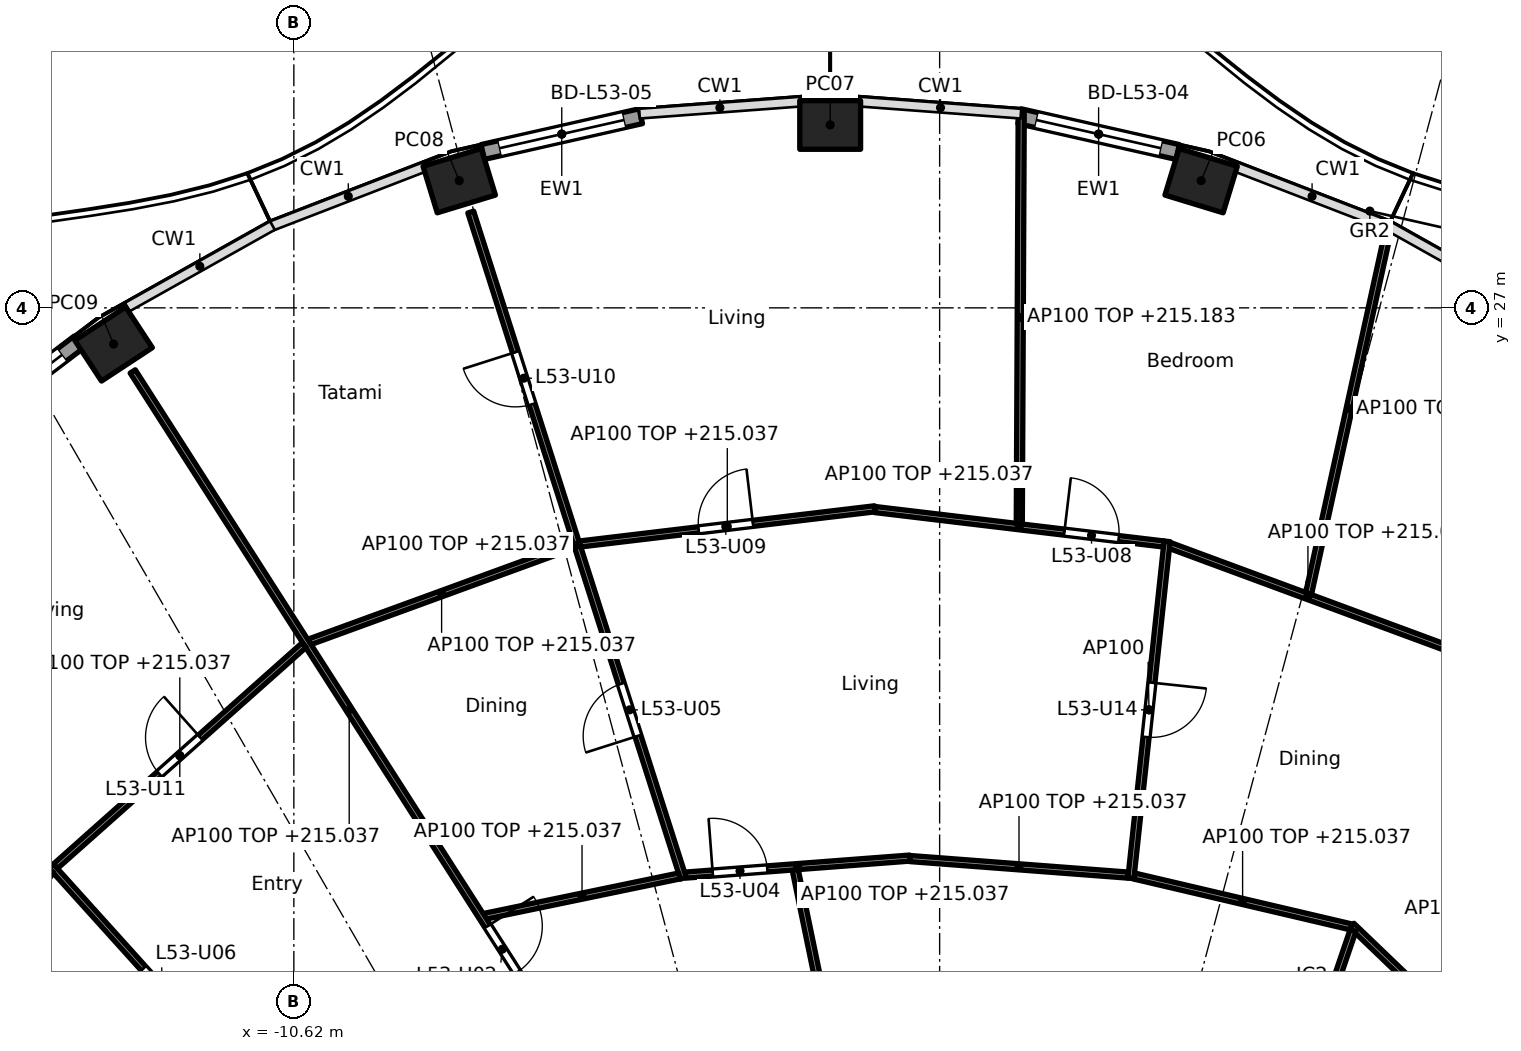
"""IFC4 building model, lengths in metres.
Left out: names, types, materials, properties, quantities, classifications, styles, units other than length and angle.
Written with IfcOpenShell. Run it as: python <this file> out.ifc"""

import sys

from ifc_helpers import new_model, si_unit, direction, frame, frame_2d, origin, origin_2d, place, context, subcontext, project, spatial, rectangle, hollow_rectangle, extrude, element, fill, save


model = new_model("IFC4")
c1 = context("Model", 3, precision=1e-05, world=origin(), true_north=direction((0.0, 1.0)))
c2 = subcontext(c1, "Body", "Model", "MODEL_VIEW")
j1 = project(units=[si_unit("LENGTHUNIT", "METRE"), si_unit("PLANEANGLEUNIT", "RADIAN")], contexts=[c1])
p1 = place(None, origin())
s1 = spatial("IfcSite", under=j1, at=p1, CompositionType="ELEMENT")
p2 = place(p1, origin())
s2 = spatial("IfcBuilding", under=s1, at=p2, CompositionType="ELEMENT")
p3 = place(p2, frame((0.0, 0.0, 212.2)))
s3 = spatial("IfcBuildingStorey", under=s2, at=p3, CompositionType="ELEMENT", Elevation=212.2)
for number, where, z_axis, x_axis in (
    (1, (4.3, 29.092, -0.26), (0.0, 0.0, 1.0), (-0.957, 0.292, 0.0)),
    (2, (-1.8, 30.008, -0.26), (0.0, 0.0, 1.0), (-1.0, 0.0, 0.0)),
    (3, (-7.9, 29.092, -0.26), (0.0, 0.0, 1.0), (-0.957, -0.292, 0.0)),
    (4, (-13.585, 26.405, -0.26), (0.0, 0.0, 1.0), (-0.836, -0.549, 0.0)),
):
    element("IfcColumn", number, at=place(p3, frame(where, z_axis=z_axis, x_axis=x_axis)), inside=s3, PredefinedType="COLUMN", context=c2, shape_type="SweptSolid", body=[
        extrude(hollow_rectangle(XDim=1.0, YDim=0.8, WallThickness=0.032, at=origin_2d()), origin(), (0.0, 0.0, 1.0), 3.96),
    ])
p4 = place(p3, frame((1.314, 30.151, 0.0), z_axis=(0.0, 0.0, 1.0), x_axis=(0.975324089124, -0.220777990694, 0.0)))
e5 = element("IfcWall", 5, at=p4, inside=s3, PredefinedType="SOLIDWALL", context=c2, shape_type="SweptSolid", body=[
    extrude(rectangle(XDim=2.666, YDim=0.25, at=frame_2d((1.333, 0.0))), origin(), (0.0, 0.0, 1.0), 3.44),
])
p5 = place(p4, frame((0.283, 0.0, 0.0)))
e6 = element("IfcOpeningElement", 6, at=p5, cuts=e5, PredefinedType="OPENING", context=c2, shape_type="SweptSolid", body=[
    extrude(rectangle(XDim=2.1, YDim=2.4, at=frame_2d((1.05, 1.2))), frame((0.0, 0.135, 0.0), z_axis=(0.0, -1.0, 0.0), x_axis=(1.0, 0.0, 0.0)), (0.0, 0.0, 1.0), 0.27),
])
p6 = place(p3, frame((-7.514, 29.563, 0.0), z_axis=(0.0, 0.0, 1.0), x_axis=(0.975324089124, 0.220777990694, 0.0)))
e7 = element("IfcWall", 7, at=p6, inside=s3, PredefinedType="SOLIDWALL", context=c2, shape_type="SweptSolid", body=[
    extrude(rectangle(XDim=2.666, YDim=0.25, at=frame_2d((1.333, 0.0))), origin(), (0.0, 0.0, 1.0), 3.44),
])
p7 = place(p6, frame((0.283, 0.0, 0.0)))
e8 = element("IfcOpeningElement", 8, at=p7, cuts=e7, PredefinedType="OPENING", context=c2, shape_type="SweptSolid", body=[
    extrude(rectangle(XDim=2.1, YDim=2.4, at=frame_2d((1.05, 1.2))), frame((0.0, 0.135, 0.0), z_axis=(0.0, -1.0, 0.0), x_axis=(1.0, 0.0, 0.0)), (0.0, 0.0, 1.0), 0.27),
])
p8 = place(p3, frame((-16.377, 24.748, 0.0), z_axis=(0.0, 0.0, 1.0), x_axis=(0.795990084031, 0.60530966135, 0.0)))
e9 = element("IfcWall", 9, at=p8, inside=s3, PredefinedType="SOLIDWALL", context=c2, shape_type="SweptSolid", body=[
    extrude(rectangle(XDim=2.789, YDim=0.25, at=frame_2d((1.394, 0.0))), origin(), (0.0, 0.0, 1.0), 3.44),
])
p9 = place(p8, frame((0.344, 0.0, 0.0)))
e10 = element("IfcOpeningElement", 10, at=p9, cuts=e9, PredefinedType="OPENING", context=c2, shape_type="SweptSolid", body=[
    extrude(rectangle(XDim=2.1, YDim=2.4, at=frame_2d((1.05, 1.2))), frame((0.0, 0.135, 0.0), z_axis=(0.0, -1.0, 0.0), x_axis=(1.0, 0.0, 0.0)), (0.0, 0.0, 1.0), 0.27),
])
p10 = place(p3, frame((7.71, 10.197, 0.0), z_axis=(0.0, 0.0, 1.0), x_axis=(0.521477621335, 0.853264959111, 0.0)))
e11 = element("IfcWall", 11, at=p10, inside=s3, PredefinedType="PARTITIONING", context=c2, shape_type="SweptSolid", body=[
    extrude(rectangle(XDim=8.941, YDim=0.1, at=frame_2d((4.471, 0.0))), origin(), (0.0, 0.0, 1.0), 2.762),
])
p11 = place(p10, frame((6.121, 0.0, 0.0)))
e12 = element("IfcOpeningElement", 12, at=p11, cuts=e11, PredefinedType="OPENING", context=c2, shape_type="SweptSolid", body=[
    extrude(rectangle(XDim=0.9, YDim=2.1, at=frame_2d((0.45, 1.05))), frame((0.0, 0.06, 0.0), z_axis=(0.0, -1.0, 0.0), x_axis=(1.0, 0.0, 0.0)), (0.0, 0.0, 1.0), 0.12),
])
p12 = place(p3, frame((9.89, 13.858, 0.0), z_axis=(0.0, 0.0, 1.0), x_axis=(-0.72167233993, 0.692234811159, 0.0)))
e13 = element("IfcWall", 13, at=p12, inside=s3, PredefinedType="PARTITIONING", context=c2, shape_type="SweptSolid", body=[
    extrude(rectangle(XDim=4.313, YDim=0.1, at=frame_2d((2.156, 0.0))), origin(), (0.0, 0.0, 1.0), 2.837),
])
p13 = place(p12, frame((0.883, 0.0, 0.0)))
e14 = element("IfcOpeningElement", 14, at=p13, cuts=e13, PredefinedType="OPENING", context=c2, shape_type="SweptSolid", body=[
    extrude(rectangle(XDim=0.9, YDim=2.1, at=frame_2d((0.45, 1.05))), frame((0.0, 0.06, 0.0), z_axis=(0.0, -1.0, 0.0), x_axis=(1.0, 0.0, 0.0)), (0.0, 0.0, 1.0), 0.12),
])
p14 = place(p3, frame((6.139, 14.829, 0.0), z_axis=(0.0, 0.0, 1.0), x_axis=(0.32278593828, 0.946471995385, 0.0)))
e15 = element("IfcWall", 15, at=p14, inside=s3, PredefinedType="PARTITIONING", context=c2, shape_type="SweptSolid", body=[
    extrude(rectangle(XDim=2.042, YDim=0.1, at=frame_2d((1.021, 0.0))), origin(), (0.0, 0.0, 1.0), 3.44),
])
p15 = place(p3, frame((6.766, 16.82, 0.0), z_axis=(0.0, 0.0, 1.0), x_axis=(-0.973612608559, 0.22820711745, 0.0)))
e16 = element("IfcWall", 16, at=p15, inside=s3, PredefinedType="PARTITIONING", context=c2, shape_type="SweptSolid", body=[
    extrude(rectangle(XDim=3.663, YDim=0.1, at=frame_2d((1.832, 0.0))), origin(), (0.0, 0.0, 1.0), 2.837),
])
p16 = place(p3, frame((8.331, 21.411, 0.0), z_axis=(0.0, 0.0, 1.0), x_axis=(-0.937891982431, 0.346927412136, 0.0)))
e17 = element("IfcWall", 17, at=p16, inside=s3, PredefinedType="PARTITIONING", context=c2, shape_type="SweptSolid", body=[
    extrude(rectangle(XDim=4.85, YDim=0.1, at=frame_2d((2.425, 0.0))), origin(), (0.0, 0.0, 1.0), 2.837),
])
p17 = place(p3, frame((6.067, 22.301, 0.0), z_axis=(0.0, 0.0, 1.0), x_axis=(0.214401821533, 0.976745544614, 0.0)))
e18 = element("IfcWall", 18, at=p17, inside=s3, PredefinedType="PARTITIONING", context=c2, shape_type="SweptSolid", body=[
    extrude(rectangle(XDim=6.228, YDim=0.1, at=frame_2d((3.114, 0.0))), origin(), (0.0, 0.0, 1.0), 2.983),
])
p18 = place(p3, frame((3.145, 17.618, 0.0), z_axis=(0.0, 0.0, 1.0), x_axis=(0.106820754108, 0.994278294288, 0.0)))
e19 = element("IfcWall", 19, at=p18, inside=s3, PredefinedType="PARTITIONING", context=c2, shape_type="SweptSolid", body=[
    extrude(rectangle(XDim=5.574, YDim=0.1, at=frame_2d((2.787, 0.0))), origin(), (0.0, 0.0, 1.0), 3.44),
])
p19 = place(p18, frame((2.337, 0.0, 0.0)))
e20 = element("IfcOpeningElement", 20, at=p19, cuts=e19, PredefinedType="OPENING", context=c2, shape_type="SweptSolid", body=[
    extrude(rectangle(XDim=0.9, YDim=2.1, at=frame_2d((0.45, 1.05))), frame((0.0, 0.06, 0.0), z_axis=(0.0, -1.0, 0.0), x_axis=(1.0, 0.0, 0.0)), (0.0, 0.0, 1.0), 0.12),
])
p20 = place(p3, frame((3.101, 17.671, 0.0), z_axis=(0.0, 0.0, 1.0), x_axis=(-0.997133705575, 0.075659587668, 0.0)))
e21 = element("IfcWall", 21, at=p20, inside=s3, PredefinedType="PARTITIONING", context=c2, shape_type="SweptSolid", body=[
    extrude(rectangle(XDim=3.601, YDim=0.1, at=frame_2d((1.801, 0.0))), origin(), (0.0, 0.0, 1.0), 2.837),
])
p21 = place(p3, frame((3.686, 23.117, 0.0), z_axis=(0.0, 0.0, 1.0), x_axis=(-0.992965872314, 0.11840091393, 0.0)))
e22 = element("IfcWall", 22, at=p21, inside=s3, PredefinedType="PARTITIONING", context=c2, shape_type="SweptSolid", body=[
    extrude(rectangle(XDim=4.786, YDim=0.1, at=frame_2d((2.393, 0.0))), origin(), (0.0, 0.0, 1.0), 2.837),
])
p22 = place(p21, frame((0.746, 0.0, 0.0)))
e23 = element("IfcOpeningElement", 23, at=p22, cuts=e22, PredefinedType="OPENING", context=c2, shape_type="SweptSolid", body=[
    extrude(rectangle(XDim=0.9, YDim=2.1, at=frame_2d((0.45, 1.05))), frame((0.0, 0.06, 0.0), z_axis=(0.0, -1.0, 0.0), x_axis=(1.0, 0.0, 0.0)), (0.0, 0.0, 1.0), 0.12),
])
p23 = place(p3, frame((1.31, 23.45, 0.0), z_axis=(0.0, 0.0, 1.0), x_axis=(0.004678732305, 0.999989054672, 0.0)))
e24 = element("IfcWall", 24, at=p23, inside=s3, PredefinedType="PARTITIONING", context=c2, shape_type="SweptSolid", body=[
    extrude(rectangle(XDim=6.783, YDim=0.1, at=frame_2d((3.392, 0.0))), origin(), (0.0, 0.0, 1.0), 2.983),
])
p24 = place(p3, frame((-0.49, 17.951, 0.0), z_axis=(0.0, 0.0, 1.0), x_axis=(-0.997133495787, -0.075662352452, 0.0)))
e25 = element("IfcWall", 25, at=p24, inside=s3, PredefinedType="PARTITIONING", context=c2, shape_type="SweptSolid", body=[
    extrude(rectangle(XDim=3.701, YDim=0.1, at=frame_2d((1.851, 0.0))), origin(), (0.0, 0.0, 1.0), 2.837),
])
p25 = place(p24, frame((2.351, 0.0, 0.0)))
e26 = element("IfcOpeningElement", 26, at=p25, cuts=e25, PredefinedType="OPENING", context=c2, shape_type="SweptSolid", body=[
    extrude(rectangle(XDim=0.9, YDim=2.1, at=frame_2d((0.45, 1.05))), frame((0.0, 0.06, 0.0), z_axis=(0.0, -1.0, 0.0), x_axis=(1.0, 0.0, 0.0)), (0.0, 0.0, 1.0), 0.12),
])
p26 = place(p3, frame((-1.066, 23.695, 0.0), z_axis=(0.0, 0.0, 1.0), x_axis=(-0.992962413335, -0.118429918957, 0.0)))
e27 = element("IfcWall", 27, at=p26, inside=s3, PredefinedType="PARTITIONING", context=c2, shape_type="SweptSolid", body=[
    extrude(rectangle(XDim=4.886, YDim=0.1, at=frame_2d((2.443, 0.0))), origin(), (0.0, 0.0, 1.0), 2.837),
])
p27 = place(p26, frame((2.018, 0.0, 0.0)))
e28 = element("IfcOpeningElement", 28, at=p27, cuts=e27, PredefinedType="OPENING", context=c2, shape_type="SweptSolid", body=[
    extrude(rectangle(XDim=0.9, YDim=2.1, at=frame_2d((0.45, 1.05))), frame((0.0, 0.06, 0.0), z_axis=(0.0, -1.0, 0.0), x_axis=(1.0, 0.0, 0.0)), (0.0, 0.0, 1.0), 0.12),
])
p28 = place(p3, frame((-1.321, 12.663, 0.0), z_axis=(0.0, 0.0, 1.0), x_axis=(-0.202526486639, 0.979276785291, 0.0)))
e29 = element("IfcWall", 29, at=p28, inside=s3, PredefinedType="PARTITIONING", context=c2, shape_type="SweptSolid", body=[
    extrude(rectangle(XDim=5.204, YDim=0.1, at=frame_2d((2.602, 0.0))), origin(), (0.0, 0.0, 1.0), 2.762),
])
p29 = place(p28, frame((2.152, 0.0, 0.0)))
e30 = element("IfcOpeningElement", 30, at=p29, cuts=e29, PredefinedType="OPENING", context=c2, shape_type="SweptSolid", body=[
    extrude(rectangle(XDim=0.9, YDim=2.1, at=frame_2d((0.45, 1.05))), frame((0.0, 0.06, 0.0), z_axis=(0.0, -1.0, 0.0), x_axis=(1.0, 0.0, 0.0)), (0.0, 0.0, 1.0), 0.12),
])
p30 = place(p3, frame((-4.215, 17.62, 0.0), z_axis=(0.0, 0.0, 1.0), x_axis=(-0.303985237897, 0.952676742206, 0.0)))
e31 = element("IfcWall", 31, at=p30, inside=s3, PredefinedType="PARTITIONING", context=c2, shape_type="SweptSolid", body=[
    extrude(rectangle(XDim=11.499, YDim=0.1, at=frame_2d((5.75, 0.0))), origin(), (0.0, 0.0, 1.0), 2.837),
])
p31 = place(p30, frame((2.457, 0.0, 0.0)))
e32 = element("IfcOpeningElement", 32, at=p31, cuts=e31, PredefinedType="OPENING", context=c2, shape_type="SweptSolid", body=[
    extrude(rectangle(XDim=0.9, YDim=2.1, at=frame_2d((0.45, 1.05))), frame((0.0, 0.06, 0.0), z_axis=(0.0, -1.0, 0.0), x_axis=(1.0, 0.0, 0.0)), (0.0, 0.0, 1.0), 0.12),
])
p32 = place(p30, frame((8.181, 0.0, 0.0)))
e33 = element("IfcOpeningElement", 33, at=p32, cuts=e31, PredefinedType="OPENING", context=c2, shape_type="SweptSolid", body=[
    extrude(rectangle(XDim=0.9, YDim=2.1, at=frame_2d((0.45, 1.05))), frame((0.0, 0.06, 0.0), z_axis=(0.0, -1.0, 0.0), x_axis=(1.0, 0.0, 0.0)), (0.0, 0.0, 1.0), 0.12),
])
p33 = place(p3, frame((-4.28, 17.657, 0.0), z_axis=(0.0, 0.0, 1.0), x_axis=(-0.979205232861, -0.202872156637, 0.0)))
e34 = element("IfcWall", 34, at=p33, inside=s3, PredefinedType="PARTITIONING", context=c2, shape_type="SweptSolid", body=[
    extrude(rectangle(XDim=3.271, YDim=0.1, at=frame_2d((1.635, 0.0))), origin(), (0.0, 0.0, 1.0), 2.837),
])
p34 = place(p3, frame((-6.014, 23.094, 0.0), z_axis=(0.0, 0.0, 1.0), x_axis=(-0.939417400947, -0.342775359089, 0.0)))
e35 = element("IfcWall", 35, at=p34, inside=s3, PredefinedType="PARTITIONING", context=c2, shape_type="SweptSolid", body=[
    extrude(rectangle(XDim=4.633, YDim=0.1, at=frame_2d((2.316, 0.0))), origin(), (0.0, 0.0, 1.0), 2.837),
])
p35 = place(p3, frame((-6.15, 14.824, 0.0), z_axis=(0.0, 0.0, 1.0), x_axis=(-0.538870687577, 0.842388498301, 0.0)))
e36 = element("IfcWall", 36, at=p35, inside=s3, PredefinedType="PARTITIONING", context=c2, shape_type="SweptSolid", body=[
    extrude(rectangle(XDim=13.213, YDim=0.1, at=frame_2d((6.606, 0.0))), origin(), (0.0, 0.0, 1.0), 2.837),
])
p36 = place(p35, frame((1.483, 0.0, 0.0)))
e37 = element("IfcOpeningElement", 37, at=p36, cuts=e36, PredefinedType="OPENING", context=c2, shape_type="SweptSolid", body=[
    extrude(rectangle(XDim=0.9, YDim=2.1, at=frame_2d((0.45, 1.05))), frame((0.0, 0.06, 0.0), z_axis=(0.0, -1.0, 0.0), x_axis=(1.0, 0.0, 0.0)), (0.0, 0.0, 1.0), 0.12),
])
p37 = place(p3, frame((-10.45, 21.455, 0.0), z_axis=(0.0, 0.0, 1.0), x_axis=(-0.747150931973, -0.66465441009, 0.0)))
e38 = element("IfcWall", 38, at=p37, inside=s3, PredefinedType="PARTITIONING", context=c2, shape_type="SweptSolid", body=[
    extrude(rectangle(XDim=5.475, YDim=0.1, at=frame_2d((2.737, 0.0))), origin(), (0.0, 0.0, 1.0), 2.837),
])
p38 = place(p37, frame((2.288, 0.0, 0.0)))
e39 = element("IfcOpeningElement", 39, at=p38, cuts=e38, PredefinedType="OPENING", context=c2, shape_type="SweptSolid", body=[
    extrude(rectangle(XDim=0.9, YDim=2.1, at=frame_2d((0.45, 1.05))), frame((0.0, 0.06, 0.0), z_axis=(0.0, -1.0, 0.0), x_axis=(1.0, 0.0, 0.0)), (0.0, 0.0, 1.0), 0.12),
])
p39 = place(p3, frame((-7.725, 10.186, 0.0), z_axis=(0.0, 0.0, 1.0), x_axis=(-0.669819599194, 0.742523874725, 0.0)))
e40 = element("IfcWall", 40, at=p39, inside=s3, PredefinedType="PARTITIONING", context=c2, shape_type="SweptSolid", body=[
    extrude(rectangle(XDim=10.282, YDim=0.1, at=frame_2d((5.141, 0.0))), origin(), (0.0, 0.0, 1.0), 2.762),
])
p40 = place(p39, frame((2.0, 0.0, 0.0)))
e41 = element("IfcOpeningElement", 41, at=p40, cuts=e40, PredefinedType="OPENING", context=c2, shape_type="SweptSolid", body=[
    extrude(rectangle(XDim=0.9, YDim=2.1, at=frame_2d((0.45, 1.05))), frame((0.0, 0.06, 0.0), z_axis=(0.0, -1.0, 0.0), x_axis=(1.0, 0.0, 0.0)), (0.0, 0.0, 1.0), 0.12),
])
p41 = place(p39, frame((7.116, 0.0, 0.0)))
e42 = element("IfcOpeningElement", 42, at=p41, cuts=e40, PredefinedType="OPENING", context=c2, shape_type="SweptSolid", body=[
    extrude(rectangle(XDim=0.9, YDim=2.1, at=frame_2d((0.45, 1.05))), frame((0.0, 0.06, 0.0), z_axis=(0.0, -1.0, 0.0), x_axis=(1.0, 0.0, 0.0)), (0.0, 0.0, 1.0), 0.12),
])
p42 = place(p3, frame((-14.608, 17.743, 0.0), z_axis=(0.0, 0.0, 1.0), x_axis=(-0.596174489482, -0.8028548923, 0.0)))
e43 = element("IfcWall", 43, at=p42, inside=s3, PredefinedType="PARTITIONING", context=c2, shape_type="SweptSolid", body=[
    extrude(rectangle(XDim=5.442, YDim=0.1, at=frame_2d((2.721, 0.0))), origin(), (0.0, 0.0, 1.0), 2.837),
])
p43 = place(p5, origin())
e44 = element("IfcDoor", 44, at=p43, inside=s3, OperationType="SLIDING_TO_LEFT", PredefinedType="DOOR", context=c2, shape_type="SweptSolid", body=[
    extrude(rectangle(XDim=2.1, YDim=2.4, at=frame_2d((1.05, 1.2))), frame((0.0, 0.025, 0.0), z_axis=(0.0, -1.0, 0.0), x_axis=(1.0, 0.0, 0.0)), (0.0, 0.0, 1.0), 0.05),
])
fill(e6, e44)
p44 = place(p7, origin())
e45 = element("IfcDoor", 45, at=p44, inside=s3, OperationType="SLIDING_TO_LEFT", PredefinedType="DOOR", context=c2, shape_type="SweptSolid", body=[
    extrude(rectangle(XDim=2.1, YDim=2.4, at=frame_2d((1.05, 1.2))), frame((0.0, 0.025, 0.0), z_axis=(0.0, -1.0, 0.0), x_axis=(1.0, 0.0, 0.0)), (0.0, 0.0, 1.0), 0.05),
])
fill(e8, e45)
p45 = place(p9, origin())
e46 = element("IfcDoor", 46, at=p45, inside=s3, OperationType="SLIDING_TO_LEFT", PredefinedType="DOOR", context=c2, shape_type="SweptSolid", body=[
    extrude(rectangle(XDim=2.1, YDim=2.4, at=frame_2d((1.05, 1.2))), frame((0.0, 0.025, 0.0), z_axis=(0.0, -1.0, 0.0), x_axis=(1.0, 0.0, 0.0)), (0.0, 0.0, 1.0), 0.05),
])
fill(e10, e46)
p46 = place(p36, frame((0.9, 0.0, 0.0), x_axis=(-1.0, 0.0, 0.0)))
e47 = element("IfcDoor", 47, at=p46, inside=s3, OperationType="SINGLE_SWING_LEFT", PredefinedType="DOOR", context=c2, shape_type="SweptSolid", body=[
    extrude(rectangle(XDim=0.9, YDim=2.1, at=frame_2d((0.45, 1.05))), frame((0.0, 0.025, 0.0), z_axis=(0.0, -1.0, 0.0), x_axis=(1.0, 0.0, 0.0)), (0.0, 0.0, 1.0), 0.05),
])
fill(e37, e47)
p47 = place(p25, frame((0.9, 0.0, 0.0), x_axis=(-1.0, 0.0, 0.0)))
e48 = element("IfcDoor", 48, at=p47, inside=s3, OperationType="SINGLE_SWING_LEFT", PredefinedType="DOOR", context=c2, shape_type="SweptSolid", body=[
    extrude(rectangle(XDim=0.9, YDim=2.1, at=frame_2d((0.45, 1.05))), frame((0.0, 0.025, 0.0), z_axis=(0.0, -1.0, 0.0), x_axis=(1.0, 0.0, 0.0)), (0.0, 0.0, 1.0), 0.05),
])
fill(e26, e48)
p48 = place(p31, origin())
e49 = element("IfcDoor", 49, at=p48, inside=s3, OperationType="SINGLE_SWING_LEFT", PredefinedType="DOOR", context=c2, shape_type="SweptSolid", body=[
    extrude(rectangle(XDim=0.9, YDim=2.1, at=frame_2d((0.45, 1.05))), frame((0.0, 0.025, 0.0), z_axis=(0.0, -1.0, 0.0), x_axis=(1.0, 0.0, 0.0)), (0.0, 0.0, 1.0), 0.05),
])
fill(e32, e49)
p49 = place(p41, origin())
e50 = element("IfcDoor", 50, at=p49, inside=s3, OperationType="SINGLE_SWING_RIGHT", PredefinedType="DOOR", context=c2, shape_type="SweptSolid", body=[
    extrude(rectangle(XDim=0.9, YDim=2.1, at=frame_2d((0.45, 1.05))), frame((0.0, 0.025, 0.0), z_axis=(0.0, -1.0, 0.0), x_axis=(1.0, 0.0, 0.0)), (0.0, 0.0, 1.0), 0.05),
])
fill(e42, e50)
p50 = place(p22, frame((0.9, 0.0, 0.0), x_axis=(-1.0, 0.0, 0.0)))
e51 = element("IfcDoor", 51, at=p50, inside=s3, OperationType="SINGLE_SWING_LEFT", PredefinedType="DOOR", context=c2, shape_type="SweptSolid", body=[
    extrude(rectangle(XDim=0.9, YDim=2.1, at=frame_2d((0.45, 1.05))), frame((0.0, 0.025, 0.0), z_axis=(0.0, -1.0, 0.0), x_axis=(1.0, 0.0, 0.0)), (0.0, 0.0, 1.0), 0.05),
])
fill(e23, e51)
p51 = place(p27, frame((0.9, 0.0, 0.0), x_axis=(-1.0, 0.0, 0.0)))
e52 = element("IfcDoor", 52, at=p51, inside=s3, OperationType="SINGLE_SWING_RIGHT", PredefinedType="DOOR", context=c2, shape_type="SweptSolid", body=[
    extrude(rectangle(XDim=0.9, YDim=2.1, at=frame_2d((0.45, 1.05))), frame((0.0, 0.025, 0.0), z_axis=(0.0, -1.0, 0.0), x_axis=(1.0, 0.0, 0.0)), (0.0, 0.0, 1.0), 0.05),
])
fill(e28, e52)
p52 = place(p32, origin())
e53 = element("IfcDoor", 53, at=p52, inside=s3, OperationType="SINGLE_SWING_RIGHT", PredefinedType="DOOR", context=c2, shape_type="SweptSolid", body=[
    extrude(rectangle(XDim=0.9, YDim=2.1, at=frame_2d((0.45, 1.05))), frame((0.0, 0.025, 0.0), z_axis=(0.0, -1.0, 0.0), x_axis=(1.0, 0.0, 0.0)), (0.0, 0.0, 1.0), 0.05),
])
fill(e33, e53)
p53 = place(p38, frame((0.9, 0.0, 0.0), x_axis=(-1.0, 0.0, 0.0)))
e54 = element("IfcDoor", 54, at=p53, inside=s3, OperationType="SINGLE_SWING_RIGHT", PredefinedType="DOOR", context=c2, shape_type="SweptSolid", body=[
    extrude(rectangle(XDim=0.9, YDim=2.1, at=frame_2d((0.45, 1.05))), frame((0.0, 0.025, 0.0), z_axis=(0.0, -1.0, 0.0), x_axis=(1.0, 0.0, 0.0)), (0.0, 0.0, 1.0), 0.05),
])
fill(e39, e54)
p54 = place(p19, frame((0.9, 0.0, 0.0), x_axis=(-1.0, 0.0, 0.0)))
e55 = element("IfcDoor", 55, at=p54, inside=s3, OperationType="SINGLE_SWING_LEFT", PredefinedType="DOOR", context=c2, shape_type="SweptSolid", body=[
    extrude(rectangle(XDim=0.9, YDim=2.1, at=frame_2d((0.45, 1.05))), frame((0.0, 0.025, 0.0), z_axis=(0.0, -1.0, 0.0), x_axis=(1.0, 0.0, 0.0)), (0.0, 0.0, 1.0), 0.05),
])
fill(e20, e55)
save(model, sys.argv[1])
